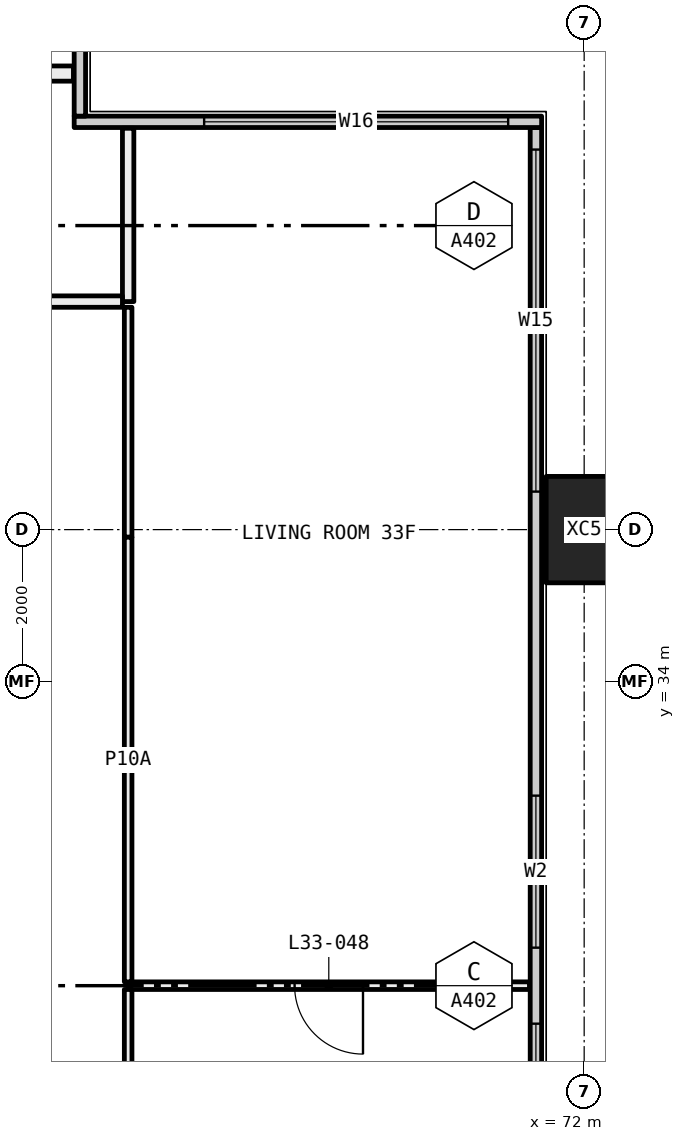
"""IFC4 building model, lengths in metres.
Left out: names, types, materials, properties, quantities, classifications, styles, units other than length and angle.
Written with IfcOpenShell. Run it as: python <this file> out.ifc"""

import sys

from ifc_helpers import new_model, si_unit, direction, frame, frame_2d, origin, origin_2d, place, context, subcontext, project, spatial, rectangle, hollow_rectangle, extrude, element, fill, save


model = new_model("IFC4")
c1 = context("Model", 3, precision=1e-05, world=origin(), true_north=direction((0.0, 1.0)))
c2 = subcontext(c1, "Body", "Model", "MODEL_VIEW")
j1 = project(units=[si_unit("LENGTHUNIT", "METRE"), si_unit("PLANEANGLEUNIT", "RADIAN")], contexts=[c1])
p1 = place(None, origin())
s1 = spatial("IfcSite", under=j1, at=p1, CompositionType="ELEMENT")
p2 = place(p1, origin())
s2 = spatial("IfcBuilding", under=s1, at=p2, CompositionType="ELEMENT")
p3 = place(p2, frame((0.0, 0.0, 127.65)))
s3 = spatial("IfcBuildingStorey", under=s2, at=p3, CompositionType="ELEMENT", Elevation=127.65)
p4 = place(p3, frame((72.0, 36.0, -0.4), z_axis=(0.0, 0.0, 1.0), x_axis=(0.0, 1.0, 0.0)))
e1 = element("IfcColumn", 1, at=p4, inside=s3, PredefinedType="COLUMN", context=c2, shape_type="SweptSolid", body=[
    extrude(hollow_rectangle(XDim=1.4, YDim=1.0, WallThickness=0.055, at=origin_2d()), origin(), (0.0, 0.0, 1.0), 3.45),
])
p5 = place(p3, frame((71.365, 18.71, 0.0), z_axis=(0.0, 0.0, 1.0), x_axis=(0.0, 1.0, 0.0)))
e2 = element("IfcWall", 2, at=p5, inside=s3, PredefinedType="ELEMENTEDWALL", context=c2, shape_type="SweptSolid", body=[
    extrude(rectangle(XDim=22.58, YDim=0.15, at=frame_2d((11.29, 0.0))), origin(), (0.0, 0.0, 1.0), 3.05),
])
p6 = place(p5, frame((0.29, 0.0, 0.45)))
e3 = element("IfcOpeningElement", 3, at=p6, cuts=e2, PredefinedType="OPENING", context=c2, shape_type="SweptSolid", body=[
    extrude(rectangle(XDim=4.5, YDim=2.55, at=frame_2d((2.25, 1.275))), frame((0.0, 0.085, 0.0), z_axis=(0.0, -1.0, 0.0), x_axis=(1.0, 0.0, 0.0)), (0.0, 0.0, 1.0), 0.17),
])
p7 = place(p5, frame((7.79, 0.0, 0.45)))
e4 = element("IfcOpeningElement", 4, at=p7, cuts=e2, PredefinedType="OPENING", context=c2, shape_type="SweptSolid", body=[
    extrude(rectangle(XDim=3.0, YDim=2.55, at=frame_2d((1.5, 1.275))), frame((0.0, 0.085, 0.0), z_axis=(0.0, -1.0, 0.0), x_axis=(1.0, 0.0, 0.0)), (0.0, 0.0, 1.0), 0.17),
])
p8 = place(p5, frame((11.79, 0.0, 0.45)))
e5 = element("IfcOpeningElement", 5, at=p8, cuts=e2, PredefinedType="OPENING", context=c2, shape_type="SweptSolid", body=[
    extrude(rectangle(XDim=2.0, YDim=2.55, at=frame_2d((1.0, 1.275))), frame((0.0, 0.085, 0.0), z_axis=(0.0, -1.0, 0.0), x_axis=(1.0, 0.0, 0.0)), (0.0, 0.0, 1.0), 0.17),
])
p9 = place(p5, frame((17.79, 0.0, 0.45)))
e6 = element("IfcOpeningElement", 6, at=p9, cuts=e2, PredefinedType="OPENING", context=c2, shape_type="SweptSolid", body=[
    extrude(rectangle(XDim=4.5, YDim=2.55, at=frame_2d((2.25, 1.275))), frame((0.0, 0.085, 0.0), z_axis=(0.0, -1.0, 0.0), x_axis=(1.0, 0.0, 0.0)), (0.0, 0.0, 1.0), 0.17),
])
p10 = place(p3, frame((65.29, 41.365, 0.0), z_axis=(0.0, 0.0, 1.0), x_axis=(1.0, 0.0, 0.0)))
e7 = element("IfcWall", 7, at=p10, inside=s3, PredefinedType="ELEMENTEDWALL", context=c2, shape_type="SweptSolid", body=[
    extrude(rectangle(XDim=6.15, YDim=0.15, at=frame_2d((3.075, 0.0))), origin(), (0.0, 0.0, 1.0), 3.05),
])
p11 = place(p10, frame((1.71, 0.0, 0.45)))
e8 = element("IfcOpeningElement", 8, at=p11, cuts=e7, PredefinedType="OPENING", context=c2, shape_type="SweptSolid", body=[
    extrude(rectangle(XDim=4.0, YDim=2.55, at=frame_2d((2.0, 1.275))), frame((0.0, 0.085, 0.0), z_axis=(0.0, -1.0, 0.0), x_axis=(1.0, 0.0, 0.0)), (0.0, 0.0, 1.0), 0.17),
])
p12 = place(p3, frame((65.365, 41.44, 0.0), z_axis=(0.0, 0.0, 1.0), x_axis=(0.0, 1.0, 0.0)))
e9 = element("IfcWall", 9, at=p12, inside=s3, PredefinedType="ELEMENTEDWALL", context=c2, shape_type="SweptSolid", body=[
    extrude(rectangle(XDim=5.85, YDim=0.15, at=frame_2d((2.925, 0.0))), origin(), (0.0, 0.0, 1.0), 3.05),
])
p13 = place(p12, frame((1.56, 0.0, 0.45)))
e10 = element("IfcOpeningElement", 10, at=p13, cuts=e9, PredefinedType="OPENING", context=c2, shape_type="SweptSolid", body=[
    extrude(rectangle(XDim=4.0, YDim=2.55, at=frame_2d((2.0, 1.275))), frame((0.0, 0.085, 0.0), z_axis=(0.0, -1.0, 0.0), x_axis=(1.0, 0.0, 0.0)), (0.0, 0.0, 1.0), 0.17),
])
p14 = place(p3, frame((61.9, 42.0, 0.0), z_axis=(0.0, 0.0, 1.0), x_axis=(1.0, 0.0, 0.0)))
e11 = element("IfcWall", 11, at=p14, inside=s3, PredefinedType="PARTITIONING", context=c2, shape_type="SweptSolid", body=[
    extrude(rectangle(XDim=3.38, YDim=0.2, at=frame_2d((1.69, 0.0))), origin(), (0.0, 0.0, 1.0), 3.05),
])
p15 = place(p3, frame((71.28, 30.0, 0.0), z_axis=(0.0, 0.0, 1.0), x_axis=(-1.0, 0.0, 0.0)))
e12 = element("IfcWall", 12, at=p15, inside=s3, PredefinedType="PARTITIONING", context=c2, shape_type="SweptSolid", body=[
    extrude(rectangle(XDim=5.28, YDim=0.1, at=frame_2d((2.64, 0.0))), origin(), (0.0, 0.0, 1.0), 3.05),
])
p16 = place(p15, frame((2.19, 0.0, 0.0)))
e13 = element("IfcOpeningElement", 13, at=p16, cuts=e12, PredefinedType="OPENING", context=c2, shape_type="SweptSolid", body=[
    extrude(rectangle(XDim=0.9, YDim=2.1, at=frame_2d((0.45, 1.05))), frame((0.0, 0.06, 0.0), z_axis=(0.0, -1.0, 0.0), x_axis=(1.0, 0.0, 0.0)), (0.0, 0.0, 1.0), 0.12),
])
p17 = place(p3, frame((66.0, 29.95, 0.0), z_axis=(0.0, 0.0, 1.0), x_axis=(0.0, -1.0, 0.0)))
e14 = element("IfcWall", 14, at=p17, inside=s3, PredefinedType="PARTITIONING", context=c2, shape_type="SweptSolid", body=[
    extrude(rectangle(XDim=4.45, YDim=0.1, at=frame_2d((2.225, 0.0))), origin(), (0.0, 0.0, 1.0), 3.05),
])
p18 = place(p3, frame((66.0, 38.925, 0.0), z_axis=(0.0, 0.0, 1.0), x_axis=(0.0, -1.0, 0.0)))
e15 = element("IfcWall", 15, at=p18, inside=s3, PredefinedType="PARTITIONING", context=c2, shape_type="SweptSolid", body=[
    extrude(rectangle(XDim=3.025, YDim=0.1, at=frame_2d((1.513, 0.0))), origin(), (0.0, 0.0, 1.0), 2.45),
])
p19 = place(p3, frame((66.0, 35.9, 0.0), z_axis=(0.0, 0.0, 1.0), x_axis=(0.0, -1.0, 0.0)))
e16 = element("IfcWall", 16, at=p19, inside=s3, PredefinedType="PARTITIONING", context=c2, shape_type="SweptSolid", body=[
    extrude(rectangle(XDim=5.85, YDim=0.1, at=frame_2d((2.925, 0.0))), origin(), (0.0, 0.0, 1.0), 3.05),
])
p20 = place(p3, frame((66.0, 41.28, 0.0), z_axis=(0.0, 0.0, 1.0), x_axis=(0.0, -1.0, 0.0)))
e17 = element("IfcWall", 17, at=p20, inside=s3, PredefinedType="PARTITIONING", context=c2, shape_type="SweptSolid", body=[
    extrude(rectangle(XDim=2.28, YDim=0.15, at=frame_2d((1.14, 0.0))), origin(), (0.0, 0.0, 1.0), 3.05),
])
p21 = place(p3, frame((65.925, 39.0, 0.0), z_axis=(0.0, 0.0, 1.0), x_axis=(-1.0, 0.0, 0.0)))
e18 = element("IfcWall", 18, at=p21, inside=s3, PredefinedType="PARTITIONING", context=c2, shape_type="SweptSolid", body=[
    extrude(rectangle(XDim=3.925, YDim=0.15, at=frame_2d((1.962, 0.0))), origin(), (0.0, 0.0, 1.0), 3.05),
])
p22 = place(p21, frame((1.512, 0.0, 0.0)))
e19 = element("IfcOpeningElement", 19, at=p22, cuts=e18, PredefinedType="OPENING", context=c2, shape_type="SweptSolid", body=[
    extrude(rectangle(XDim=0.9, YDim=2.1, at=frame_2d((0.45, 1.05))), frame((0.0, 0.085, 0.0), z_axis=(0.0, -1.0, 0.0), x_axis=(1.0, 0.0, 0.0)), (0.0, 0.0, 1.0), 0.17),
])
p23 = place(p7, origin())
e20 = element("IfcWindow", 20, at=p23, inside=s3, PartitioningType="SINGLE_PANEL", PredefinedType="WINDOW", context=c2, shape_type="SweptSolid", body=[
    extrude(rectangle(XDim=3.0, YDim=2.55, at=frame_2d((1.5, 1.275))), frame((0.0, 0.03, 0.0), z_axis=(0.0, -1.0, 0.0), x_axis=(1.0, 0.0, 0.0)), (0.0, 0.0, 1.0), 0.06),
])
fill(e4, e20)
p24 = place(p8, origin())
e21 = element("IfcWindow", 21, at=p24, inside=s3, PartitioningType="SINGLE_PANEL", PredefinedType="WINDOW", context=c2, shape_type="SweptSolid", body=[
    extrude(rectangle(XDim=2.0, YDim=2.55, at=frame_2d((1.0, 1.275))), frame((0.0, 0.03, 0.0), z_axis=(0.0, -1.0, 0.0), x_axis=(1.0, 0.0, 0.0)), (0.0, 0.0, 1.0), 0.06),
])
fill(e5, e21)
p25 = place(p9, origin())
e22 = element("IfcWindow", 22, at=p25, inside=s3, PartitioningType="SINGLE_PANEL", PredefinedType="WINDOW", context=c2, shape_type="SweptSolid", body=[
    extrude(rectangle(XDim=4.5, YDim=2.55, at=frame_2d((2.25, 1.275))), frame((0.0, 0.03, 0.0), z_axis=(0.0, -1.0, 0.0), x_axis=(1.0, 0.0, 0.0)), (0.0, 0.0, 1.0), 0.06),
])
fill(e6, e22)
p26 = place(p11, origin())
e23 = element("IfcWindow", 23, at=p26, inside=s3, PartitioningType="SINGLE_PANEL", PredefinedType="WINDOW", context=c2, shape_type="SweptSolid", body=[
    extrude(rectangle(XDim=4.0, YDim=2.55, at=frame_2d((2.0, 1.275))), frame((0.0, 0.03, 0.0), z_axis=(0.0, -1.0, 0.0), x_axis=(1.0, 0.0, 0.0)), (0.0, 0.0, 1.0), 0.06),
])
fill(e8, e23)
p27 = place(p16, origin())
e24 = element("IfcDoor", 24, at=p27, inside=s3, OperationType="SINGLE_SWING_RIGHT", PredefinedType="DOOR", context=c2, shape_type="SweptSolid", body=[
    extrude(rectangle(XDim=0.9, YDim=2.1, at=frame_2d((0.45, 1.05))), frame((0.0, 0.025, 0.0), z_axis=(0.0, -1.0, 0.0), x_axis=(1.0, 0.0, 0.0)), (0.0, 0.0, 1.0), 0.05),
])
fill(e13, e24)
save(model, sys.argv[1])
